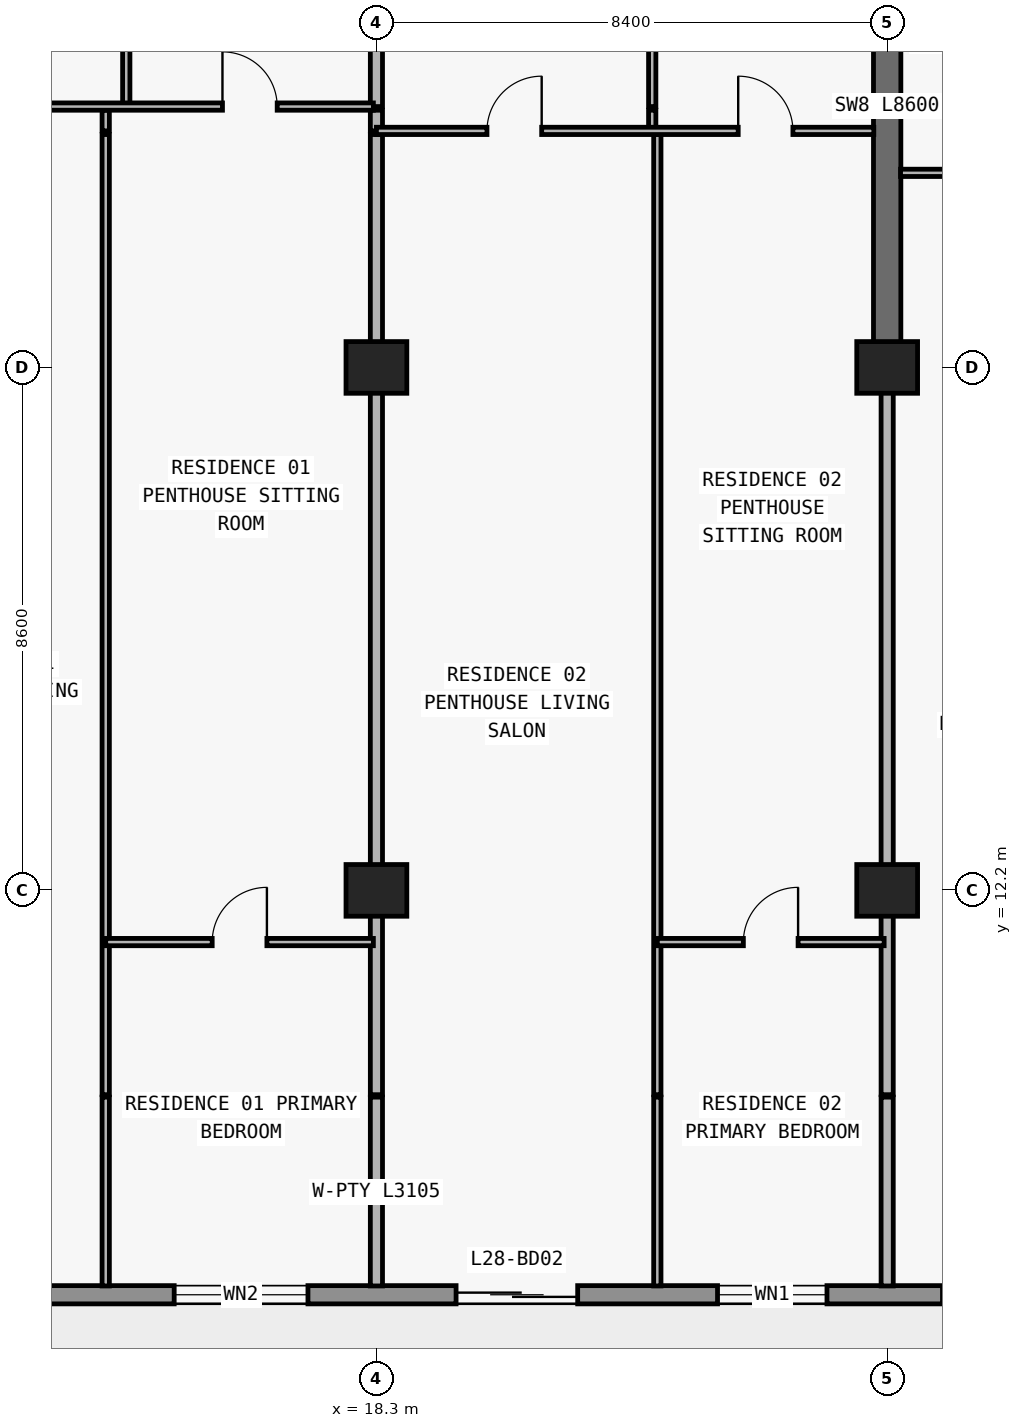
"""IFC4 building model, lengths in metres.
Left out: names, types, materials, properties, quantities, classifications, styles, units other than length and angle.
Written with IfcOpenShell. Run it as: python <this file> out.ifc"""

import sys

from ifc_helpers import new_model, si_unit, direction, frame, frame_2d, origin, origin_2d, place, context, subcontext, project, spatial, rectangle, extrude, element, fill, save


model = new_model("IFC4")
c1 = context("Model", 3, precision=1e-05, world=origin(), true_north=direction((0.0, 1.0)))
c2 = subcontext(c1, "Body", "Model", "MODEL_VIEW")
j1 = project(units=[si_unit("LENGTHUNIT", "METRE"), si_unit("PLANEANGLEUNIT", "RADIAN")], contexts=[c1])
p1 = place(None, origin())
s1 = spatial("IfcSite", under=j1, at=p1, CompositionType="ELEMENT")
p2 = place(p1, origin())
s2 = spatial("IfcBuilding", under=s1, at=p2, CompositionType="ELEMENT")
p3 = place(p2, frame((0.0, 0.0, 105.9)))
s3 = spatial("IfcBuildingStorey", under=s2, at=p3, CompositionType="ELEMENT", Elevation=105.9)
for number, where, z_axis, x_axis in (
    (1, (18.3, 12.2, 0.0), (0.0, 0.0, 1.0), (1.0, 0.0, 0.0)),
    (2, (26.7, 12.2, 0.0), (0.0, 0.0, 1.0), (1.0, 0.0, 0.0)),
    (3, (18.3, 20.8, 0.0), (0.0, 0.0, 1.0), (1.0, 0.0, 0.0)),
    (4, (26.7, 20.8, 0.0), (0.0, 0.0, 1.0), (1.0, 0.0, 0.0)),
):
    element("IfcColumn", number, at=place(p3, frame(where, z_axis=z_axis, x_axis=x_axis)), inside=s3, PredefinedType="COLUMN", context=c2, shape_type="SweptSolid", body=[
        extrude(rectangle(XDim=1.0, YDim=0.85, at=origin_2d()), origin(), (0.0, 0.0, 1.0), 3.05),
    ])
p4 = place(p3, frame((26.7, 20.8, 0.0), z_axis=(0.0, 0.0, 1.0), x_axis=(0.0, 1.0, 0.0)))
e5 = element("IfcWall", 5, at=p4, inside=s3, PredefinedType="SHEAR", context=c2, shape_type="SweptSolid", body=[
    extrude(rectangle(XDim=8.6, YDim=0.45, at=frame_2d((4.3, 0.0))), origin(), (0.0, 0.0, 1.0), 3.05),
])
p5 = place(p3, frame((70.1, 5.55, 0.0), z_axis=(0.0, 0.0, 1.0), x_axis=(-1.0, 0.0, 0.0)))
e6 = element("IfcWall", 6, at=p5, inside=s3, PredefinedType="STANDARD", context=c2, shape_type="SweptSolid", body=[
    extrude(rectangle(XDim=62.4, YDim=0.3, at=frame_2d((31.2, 0.0))), origin(), (0.0, 0.0, 1.0), 3.05),
])
p6 = place(p5, frame((57.226, 0.0, 0.0)))
e7 = element("IfcOpeningElement", 7, at=p6, cuts=e6, PredefinedType="OPENING", context=c2, shape_type="SweptSolid", body=[
    extrude(rectangle(XDim=2.0, YDim=2.3, at=frame_2d((1.0, 1.15))), frame((0.0, 0.16, 0.0), z_axis=(0.0, -1.0, 0.0), x_axis=(1.0, 0.0, 0.0)), (0.0, 0.0, 1.0), 0.32),
])
p7 = place(p5, frame((52.926, 0.0, 0.85)))
e8 = element("IfcOpeningElement", 8, at=p7, cuts=e6, PredefinedType="OPENING", context=c2, shape_type="SweptSolid", body=[
    extrude(rectangle(XDim=2.2, YDim=1.55, at=frame_2d((1.1, 0.775))), frame((0.0, 0.16, 0.0), z_axis=(0.0, -1.0, 0.0), x_axis=(1.0, 0.0, 0.0)), (0.0, 0.0, 1.0), 0.32),
])
p8 = place(p5, frame((48.49, 0.0, 0.0)))
e9 = element("IfcOpeningElement", 9, at=p8, cuts=e6, PredefinedType="OPENING", context=c2, shape_type="SweptSolid", body=[
    extrude(rectangle(XDim=2.0, YDim=2.3, at=frame_2d((1.0, 1.15))), frame((0.0, 0.16, 0.0), z_axis=(0.0, -1.0, 0.0), x_axis=(1.0, 0.0, 0.0)), (0.0, 0.0, 1.0), 0.32),
])
p9 = place(p5, frame((44.39, 0.0, 0.85)))
e10 = element("IfcOpeningElement", 10, at=p9, cuts=e6, PredefinedType="OPENING", context=c2, shape_type="SweptSolid", body=[
    extrude(rectangle(XDim=1.8, YDim=1.55, at=frame_2d((0.9, 0.775))), frame((0.0, 0.16, 0.0), z_axis=(0.0, -1.0, 0.0), x_axis=(1.0, 0.0, 0.0)), (0.0, 0.0, 1.0), 0.32),
])
p10 = place(p5, frame((40.49, 0.0, 0.0)))
e11 = element("IfcOpeningElement", 11, at=p10, cuts=e6, PredefinedType="OPENING", context=c2, shape_type="SweptSolid", body=[
    extrude(rectangle(XDim=2.0, YDim=2.3, at=frame_2d((1.0, 1.15))), frame((0.0, 0.16, 0.0), z_axis=(0.0, -1.0, 0.0), x_axis=(1.0, 0.0, 0.0)), (0.0, 0.0, 1.0), 0.32),
])
p11 = place(p5, frame((35.81, 0.0, 0.65)))
e12 = element("IfcOpeningElement", 12, at=p11, cuts=e6, PredefinedType="OPENING", context=c2, shape_type="SweptSolid", body=[
    extrude(rectangle(XDim=2.6, YDim=1.85, at=frame_2d((1.3, 0.925))), frame((0.0, 0.16, 0.0), z_axis=(0.0, -1.0, 0.0), x_axis=(1.0, 0.0, 0.0)), (0.0, 0.0, 1.0), 0.32),
])
p12 = place(p5, frame((30.1, 0.0, 0.85)))
e13 = element("IfcOpeningElement", 13, at=p12, cuts=e6, PredefinedType="OPENING", context=c2, shape_type="SweptSolid", body=[
    extrude(rectangle(XDim=2.2, YDim=1.55, at=frame_2d((1.1, 0.775))), frame((0.0, 0.16, 0.0), z_axis=(0.0, -1.0, 0.0), x_axis=(1.0, 0.0, 0.0)), (0.0, 0.0, 1.0), 0.32),
])
p13 = place(p5, frame((22.1, 0.0, 0.85)))
e14 = element("IfcOpeningElement", 14, at=p13, cuts=e6, PredefinedType="OPENING", context=c2, shape_type="SweptSolid", body=[
    extrude(rectangle(XDim=2.2, YDim=1.55, at=frame_2d((1.1, 0.775))), frame((0.0, 0.16, 0.0), z_axis=(0.0, -1.0, 0.0), x_axis=(1.0, 0.0, 0.0)), (0.0, 0.0, 1.0), 0.32),
])
p14 = place(p5, frame((15.69, 0.0, 0.0)))
e15 = element("IfcOpeningElement", 15, at=p14, cuts=e6, PredefinedType="OPENING", context=c2, shape_type="SweptSolid", body=[
    extrude(rectangle(XDim=2.0, YDim=2.3, at=frame_2d((1.0, 1.15))), frame((0.0, 0.16, 0.0), z_axis=(0.0, -1.0, 0.0), x_axis=(1.0, 0.0, 0.0)), (0.0, 0.0, 1.0), 0.32),
])
p15 = place(p5, frame((11.59, 0.0, 0.85)))
e16 = element("IfcOpeningElement", 16, at=p15, cuts=e6, PredefinedType="OPENING", context=c2, shape_type="SweptSolid", body=[
    extrude(rectangle(XDim=1.8, YDim=1.55, at=frame_2d((0.9, 0.775))), frame((0.0, 0.16, 0.0), z_axis=(0.0, -1.0, 0.0), x_axis=(1.0, 0.0, 0.0)), (0.0, 0.0, 1.0), 0.32),
])
p16 = place(p5, frame((7.626, 0.0, 0.0)))
e17 = element("IfcOpeningElement", 17, at=p16, cuts=e6, PredefinedType="OPENING", context=c2, shape_type="SweptSolid", body=[
    extrude(rectangle(XDim=2.0, YDim=2.3, at=frame_2d((1.0, 1.15))), frame((0.0, 0.16, 0.0), z_axis=(0.0, -1.0, 0.0), x_axis=(1.0, 0.0, 0.0)), (0.0, 0.0, 1.0), 0.32),
])
p17 = place(p5, frame((3.326, 0.0, 0.85)))
e18 = element("IfcOpeningElement", 18, at=p17, cuts=e6, PredefinedType="OPENING", context=c2, shape_type="SweptSolid", body=[
    extrude(rectangle(XDim=2.2, YDim=1.55, at=frame_2d((1.1, 0.775))), frame((0.0, 0.16, 0.0), z_axis=(0.0, -1.0, 0.0), x_axis=(1.0, 0.0, 0.0)), (0.0, 0.0, 1.0), 0.32),
])
p18 = place(p3, frame((13.848, 5.695, 0.0), z_axis=(0.0, 0.0, 1.0), x_axis=(0.0, 1.0, 0.0)))
e19 = element("IfcWall", 19, at=p18, inside=s3, PredefinedType="PARTITIONING", context=c2, shape_type="SweptSolid", body=[
    extrude(rectangle(XDim=3.105, YDim=0.12, at=frame_2d((1.552, 0.0))), origin(), (0.0, 0.0, 1.0), 3.05),
])
p19 = place(p3, frame((13.848, 8.84, 0.0), z_axis=(0.0, 0.0, 1.0), x_axis=(0.0, 1.0, 0.0)))
e20 = element("IfcWall", 20, at=p19, inside=s3, PredefinedType="PARTITIONING", context=c2, shape_type="SweptSolid", body=[
    extrude(rectangle(XDim=15.79, YDim=0.12, at=frame_2d((7.895, 0.0))), origin(), (0.0, 0.0, 1.0), 3.05),
])
p20 = place(p3, frame((13.848, 24.69, 0.0), z_axis=(0.0, 0.0, 1.0), x_axis=(0.0, 1.0, 0.0)))
e21 = element("IfcWall", 21, at=p20, inside=s3, PredefinedType="PARTITIONING", context=c2, shape_type="SweptSolid", body=[
    extrude(rectangle(XDim=0.34, YDim=0.12, at=frame_2d((0.17, 0.0))), origin(), (0.0, 0.0, 1.0), 3.05),
])
p21 = place(p3, frame((14.186, 25.09, 0.0), z_axis=(0.0, 0.0, 1.0), x_axis=(0.0, 1.0, 0.0)))
e22 = element("IfcWall", 22, at=p21, inside=s3, PredefinedType="PARTITIONING", context=c2, shape_type="SweptSolid", body=[
    extrude(rectangle(XDim=4.69, YDim=0.12, at=frame_2d((2.345, 0.0))), origin(), (0.0, 0.0, 1.0), 3.05),
])
p22 = place(p21, frame((1.895, 0.0, 0.0)))
e23 = element("IfcOpeningElement", 23, at=p22, cuts=e22, PredefinedType="OPENING", context=c2, shape_type="SweptSolid", body=[
    extrude(rectangle(XDim=0.9, YDim=2.15, at=frame_2d((0.45, 1.075))), frame((0.0, 0.07, 0.0), z_axis=(0.0, -1.0, 0.0), x_axis=(1.0, 0.0, 0.0)), (0.0, 0.0, 1.0), 0.14),
])
p23 = place(p3, frame((18.3, 5.695, 0.0), z_axis=(0.0, 0.0, 1.0), x_axis=(0.0, 1.0, 0.0)))
e24 = element("IfcWall", 24, at=p23, inside=s3, PredefinedType="PARTITIONING", context=c2, shape_type="SweptSolid", body=[
    extrude(rectangle(XDim=3.105, YDim=0.2, at=frame_2d((1.552, 0.0))), origin(), (0.0, 0.0, 1.0), 3.05),
])
p24 = place(p3, frame((18.3, 8.84, 0.0), z_axis=(0.0, 0.0, 1.0), x_axis=(0.0, 1.0, 0.0)))
e25 = element("IfcWall", 25, at=p24, inside=s3, PredefinedType="PARTITIONING", context=c2, shape_type="SweptSolid", body=[
    extrude(rectangle(XDim=15.79, YDim=0.2, at=frame_2d((7.895, 0.0))), origin(), (0.0, 0.0, 1.0), 2.174),
])
p25 = place(p3, frame((18.3, 24.69, 0.0), z_axis=(0.0, 0.0, 1.0), x_axis=(0.0, 1.0, 0.0)))
e26 = element("IfcWall", 26, at=p25, inside=s3, PredefinedType="PARTITIONING", context=c2, shape_type="SweptSolid", body=[
    extrude(rectangle(XDim=0.34, YDim=0.2, at=frame_2d((0.17, 0.0))), origin(), (0.0, 0.0, 1.0), 2.174),
])
p26 = place(p3, frame((18.3, 25.09, 0.0), z_axis=(0.0, 0.0, 1.0), x_axis=(0.0, 1.0, 0.0)))
e27 = element("IfcWall", 27, at=p26, inside=s3, PredefinedType="PARTITIONING", context=c2, shape_type="SweptSolid", body=[
    extrude(rectangle(XDim=4.69, YDim=0.2, at=frame_2d((2.345, 0.0))), origin(), (0.0, 0.0, 1.0), 2.174),
])
p27 = place(p3, frame((22.836, 24.69, 0.0), z_axis=(0.0, 0.0, 1.0), x_axis=(0.0, 1.0, 0.0)))
e28 = element("IfcWall", 28, at=p27, inside=s3, PredefinedType="PARTITIONING", context=c2, shape_type="SweptSolid", body=[
    extrude(rectangle(XDim=0.34, YDim=0.12, at=frame_2d((0.17, 0.0))), origin(), (0.0, 0.0, 1.0), 3.05),
])
p28 = place(p3, frame((22.836, 25.09, 0.0), z_axis=(0.0, 0.0, 1.0), x_axis=(0.0, 1.0, 0.0)))
e29 = element("IfcWall", 29, at=p28, inside=s3, PredefinedType="PARTITIONING", context=c2, shape_type="SweptSolid", body=[
    extrude(rectangle(XDim=4.69, YDim=0.12, at=frame_2d((2.345, 0.0))), origin(), (0.0, 0.0, 1.0), 3.05),
])
p29 = place(p28, frame((1.895, 0.0, 0.0)))
e30 = element("IfcOpeningElement", 30, at=p29, cuts=e29, PredefinedType="OPENING", context=c2, shape_type="SweptSolid", body=[
    extrude(rectangle(XDim=0.9, YDim=2.15, at=frame_2d((0.45, 1.075))), frame((0.0, 0.07, 0.0), z_axis=(0.0, -1.0, 0.0), x_axis=(1.0, 0.0, 0.0)), (0.0, 0.0, 1.0), 0.14),
])
p30 = place(p3, frame((22.92, 5.695, 0.0), z_axis=(0.0, 0.0, 1.0), x_axis=(0.0, 1.0, 0.0)))
e31 = element("IfcWall", 31, at=p30, inside=s3, PredefinedType="PARTITIONING", context=c2, shape_type="SweptSolid", body=[
    extrude(rectangle(XDim=3.105, YDim=0.12, at=frame_2d((1.552, 0.0))), origin(), (0.0, 0.0, 1.0), 3.05),
])
p31 = place(p3, frame((22.92, 8.84, 0.0), z_axis=(0.0, 0.0, 1.0), x_axis=(0.0, 1.0, 0.0)))
e32 = element("IfcWall", 32, at=p31, inside=s3, PredefinedType="PARTITIONING", context=c2, shape_type="SweptSolid", body=[
    extrude(rectangle(XDim=15.79, YDim=0.12, at=frame_2d((7.895, 0.0))), origin(), (0.0, 0.0, 1.0), 3.05),
])
p32 = place(p3, frame((26.7, 5.695, 0.0), z_axis=(0.0, 0.0, 1.0), x_axis=(0.0, 1.0, 0.0)))
e33 = element("IfcWall", 33, at=p32, inside=s3, PredefinedType="PARTITIONING", context=c2, shape_type="SweptSolid", body=[
    extrude(rectangle(XDim=3.105, YDim=0.2, at=frame_2d((1.552, 0.0))), origin(), (0.0, 0.0, 1.0), 3.05),
])
p33 = place(p3, frame((26.7, 8.84, 0.0), z_axis=(0.0, 0.0, 1.0), x_axis=(0.0, 1.0, 0.0)))
e34 = element("IfcWall", 34, at=p33, inside=s3, PredefinedType="PARTITIONING", context=c2, shape_type="SweptSolid", body=[
    extrude(rectangle(XDim=11.955, YDim=0.2, at=frame_2d((5.978, 0.0))), origin(), (0.0, 0.0, 1.0), 2.174),
])
p34 = place(p3, frame((13.848, 11.35, 0.0), z_axis=(0.0, 0.0, 1.0), x_axis=(1.0, 0.0, 0.0)))
e35 = element("IfcWall", 35, at=p34, inside=s3, PredefinedType="PARTITIONING", context=c2, shape_type="SweptSolid", body=[
    extrude(rectangle(XDim=4.402, YDim=0.12, at=frame_2d((2.201, 0.0))), origin(), (0.0, 0.0, 1.0), 3.05),
])
p35 = place(p34, frame((1.751, 0.0, 0.0)))
e36 = element("IfcOpeningElement", 36, at=p35, cuts=e35, PredefinedType="OPENING", context=c2, shape_type="SweptSolid", body=[
    extrude(rectangle(XDim=0.9, YDim=2.15, at=frame_2d((0.45, 1.075))), frame((0.0, 0.07, 0.0), z_axis=(0.0, -1.0, 0.0), x_axis=(1.0, 0.0, 0.0)), (0.0, 0.0, 1.0), 0.14),
])
p36 = place(p3, frame((22.92, 11.35, 0.0), z_axis=(0.0, 0.0, 1.0), x_axis=(1.0, 0.0, 0.0)))
e37 = element("IfcWall", 37, at=p36, inside=s3, PredefinedType="PARTITIONING", context=c2, shape_type="SweptSolid", body=[
    extrude(rectangle(XDim=3.73, YDim=0.12, at=frame_2d((1.865, 0.0))), origin(), (0.0, 0.0, 1.0), 3.05),
])
p37 = place(p36, frame((1.415, 0.0, 0.0)))
e38 = element("IfcOpeningElement", 38, at=p37, cuts=e37, PredefinedType="OPENING", context=c2, shape_type="SweptSolid", body=[
    extrude(rectangle(XDim=0.9, YDim=2.15, at=frame_2d((0.45, 1.075))), frame((0.0, 0.07, 0.0), z_axis=(0.0, -1.0, 0.0), x_axis=(1.0, 0.0, 0.0)), (0.0, 0.0, 1.0), 0.14),
])
p38 = place(p3, frame((26.92, 24.0, 0.0), z_axis=(0.0, 0.0, 1.0), x_axis=(1.0, 0.0, 0.0)))
e39 = element("IfcWall", 39, at=p38, inside=s3, PredefinedType="PARTITIONING", context=c2, shape_type="SweptSolid", body=[
    extrude(rectangle(XDim=8.18, YDim=0.12, at=frame_2d((4.09, 0.0))), origin(), (0.0, 0.0, 1.0), 3.05),
])
p39 = place(p38, frame((1.33, 0.0, 0.0)))
e40 = element("IfcOpeningElement", 40, at=p39, cuts=e39, PredefinedType="OPENING", context=c2, shape_type="SweptSolid", body=[
    extrude(rectangle(XDim=0.9, YDim=2.15, at=frame_2d((0.45, 1.075))), frame((0.0, 0.07, 0.0), z_axis=(0.0, -1.0, 0.0), x_axis=(1.0, 0.0, 0.0)), (0.0, 0.0, 1.0), 0.14),
])
p40 = place(p3, frame((18.3, 24.69, 0.0), z_axis=(0.0, 0.0, 1.0), x_axis=(1.0, 0.0, 0.0)))
e41 = element("IfcWall", 41, at=p40, inside=s3, PredefinedType="PARTITIONING", context=c2, shape_type="SweptSolid", body=[
    extrude(rectangle(XDim=8.18, YDim=0.12, at=frame_2d((4.09, 0.0))), origin(), (0.0, 0.0, 1.0), 3.05),
])
p41 = place(p40, frame((1.818, 0.0, 0.0)))
e42 = element("IfcOpeningElement", 42, at=p41, cuts=e41, PredefinedType="OPENING", context=c2, shape_type="SweptSolid", body=[
    extrude(rectangle(XDim=0.9, YDim=2.15, at=frame_2d((0.45, 1.075))), frame((0.0, 0.07, 0.0), z_axis=(0.0, -1.0, 0.0), x_axis=(1.0, 0.0, 0.0)), (0.0, 0.0, 1.0), 0.14),
])
p42 = place(p40, frame((5.95, 0.0, 0.0)))
e43 = element("IfcOpeningElement", 43, at=p42, cuts=e41, PredefinedType="OPENING", context=c2, shape_type="SweptSolid", body=[
    extrude(rectangle(XDim=0.9, YDim=2.15, at=frame_2d((0.45, 1.075))), frame((0.0, 0.07, 0.0), z_axis=(0.0, -1.0, 0.0), x_axis=(1.0, 0.0, 0.0)), (0.0, 0.0, 1.0), 0.14),
])
p43 = place(p3, frame((9.9, 25.09, 0.0), z_axis=(0.0, 0.0, 1.0), x_axis=(1.0, 0.0, 0.0)))
e44 = element("IfcWall", 44, at=p43, inside=s3, PredefinedType="PARTITIONING", context=c2, shape_type="SweptSolid", body=[
    extrude(rectangle(XDim=8.35, YDim=0.12, at=frame_2d((4.175, 0.0))), origin(), (0.0, 0.0, 1.0), 3.05),
])
p44 = place(p43, frame((1.524, 0.0, 0.0)))
e45 = element("IfcOpeningElement", 45, at=p44, cuts=e44, PredefinedType="OPENING", context=c2, shape_type="SweptSolid", body=[
    extrude(rectangle(XDim=0.9, YDim=2.15, at=frame_2d((0.45, 1.075))), frame((0.0, 0.07, 0.0), z_axis=(0.0, -1.0, 0.0), x_axis=(1.0, 0.0, 0.0)), (0.0, 0.0, 1.0), 0.14),
])
p45 = place(p43, frame((5.868, 0.0, 0.0)))
e46 = element("IfcOpeningElement", 46, at=p45, cuts=e44, PredefinedType="OPENING", context=c2, shape_type="SweptSolid", body=[
    extrude(rectangle(XDim=0.9, YDim=2.15, at=frame_2d((0.45, 1.075))), frame((0.0, 0.07, 0.0), z_axis=(0.0, -1.0, 0.0), x_axis=(1.0, 0.0, 0.0)), (0.0, 0.0, 1.0), 0.14),
])
p46 = place(p7, origin())
e47 = element("IfcWindow", 47, at=p46, inside=s3, PartitioningType="SINGLE_PANEL", PredefinedType="WINDOW", context=c2, shape_type="SweptSolid", body=[
    extrude(rectangle(XDim=2.2, YDim=1.55, at=frame_2d((1.1, 0.775))), frame((0.0, 0.03, 0.0), z_axis=(0.0, -1.0, 0.0), x_axis=(1.0, 0.0, 0.0)), (0.0, 0.0, 1.0), 0.06),
])
fill(e8, e47)
p47 = place(p8, origin())
e48 = element("IfcDoor", 48, at=p47, inside=s3, OperationType="DOUBLE_DOOR_SLIDING", PredefinedType="DOOR", context=c2, shape_type="SweptSolid", body=[
    extrude(rectangle(XDim=2.0, YDim=2.3, at=frame_2d((1.0, 1.15))), frame((0.0, 0.025, 0.0), z_axis=(0.0, -1.0, 0.0), x_axis=(1.0, 0.0, 0.0)), (0.0, 0.0, 1.0), 0.05),
])
fill(e9, e48)
p48 = place(p9, origin())
e49 = element("IfcWindow", 49, at=p48, inside=s3, PartitioningType="SINGLE_PANEL", PredefinedType="WINDOW", context=c2, shape_type="SweptSolid", body=[
    extrude(rectangle(XDim=1.8, YDim=1.55, at=frame_2d((0.9, 0.775))), frame((0.0, 0.03, 0.0), z_axis=(0.0, -1.0, 0.0), x_axis=(1.0, 0.0, 0.0)), (0.0, 0.0, 1.0), 0.06),
])
fill(e10, e49)
p49 = place(p45, origin())
e50 = element("IfcDoor", 50, at=p49, inside=s3, OperationType="SINGLE_SWING_LEFT", PredefinedType="DOOR", context=c2, shape_type="SweptSolid", body=[
    extrude(rectangle(XDim=0.9, YDim=2.15, at=frame_2d((0.45, 1.075))), frame((0.0, 0.025, 0.0), z_axis=(0.0, -1.0, 0.0), x_axis=(1.0, 0.0, 0.0)), (0.0, 0.0, 1.0), 0.05),
])
fill(e46, e50)
p50 = place(p35, origin())
e51 = element("IfcDoor", 51, at=p50, inside=s3, OperationType="SINGLE_SWING_RIGHT", PredefinedType="DOOR", context=c2, shape_type="SweptSolid", body=[
    extrude(rectangle(XDim=0.9, YDim=2.15, at=frame_2d((0.45, 1.075))), frame((0.0, 0.025, 0.0), z_axis=(0.0, -1.0, 0.0), x_axis=(1.0, 0.0, 0.0)), (0.0, 0.0, 1.0), 0.05),
])
fill(e36, e51)
p51 = place(p41, origin())
e52 = element("IfcDoor", 52, at=p51, inside=s3, OperationType="SINGLE_SWING_RIGHT", PredefinedType="DOOR", context=c2, shape_type="SweptSolid", body=[
    extrude(rectangle(XDim=0.9, YDim=2.15, at=frame_2d((0.45, 1.075))), frame((0.0, 0.025, 0.0), z_axis=(0.0, -1.0, 0.0), x_axis=(1.0, 0.0, 0.0)), (0.0, 0.0, 1.0), 0.05),
])
fill(e42, e52)
p52 = place(p42, origin())
e53 = element("IfcDoor", 53, at=p52, inside=s3, OperationType="SINGLE_SWING_LEFT", PredefinedType="DOOR", context=c2, shape_type="SweptSolid", body=[
    extrude(rectangle(XDim=0.9, YDim=2.15, at=frame_2d((0.45, 1.075))), frame((0.0, 0.025, 0.0), z_axis=(0.0, -1.0, 0.0), x_axis=(1.0, 0.0, 0.0)), (0.0, 0.0, 1.0), 0.05),
])
fill(e43, e53)
p53 = place(p37, origin())
e54 = element("IfcDoor", 54, at=p53, inside=s3, OperationType="SINGLE_SWING_RIGHT", PredefinedType="DOOR", context=c2, shape_type="SweptSolid", body=[
    extrude(rectangle(XDim=0.9, YDim=2.15, at=frame_2d((0.45, 1.075))), frame((0.0, 0.025, 0.0), z_axis=(0.0, -1.0, 0.0), x_axis=(1.0, 0.0, 0.0)), (0.0, 0.0, 1.0), 0.05),
])
fill(e38, e54)
save(model, sys.argv[1])
